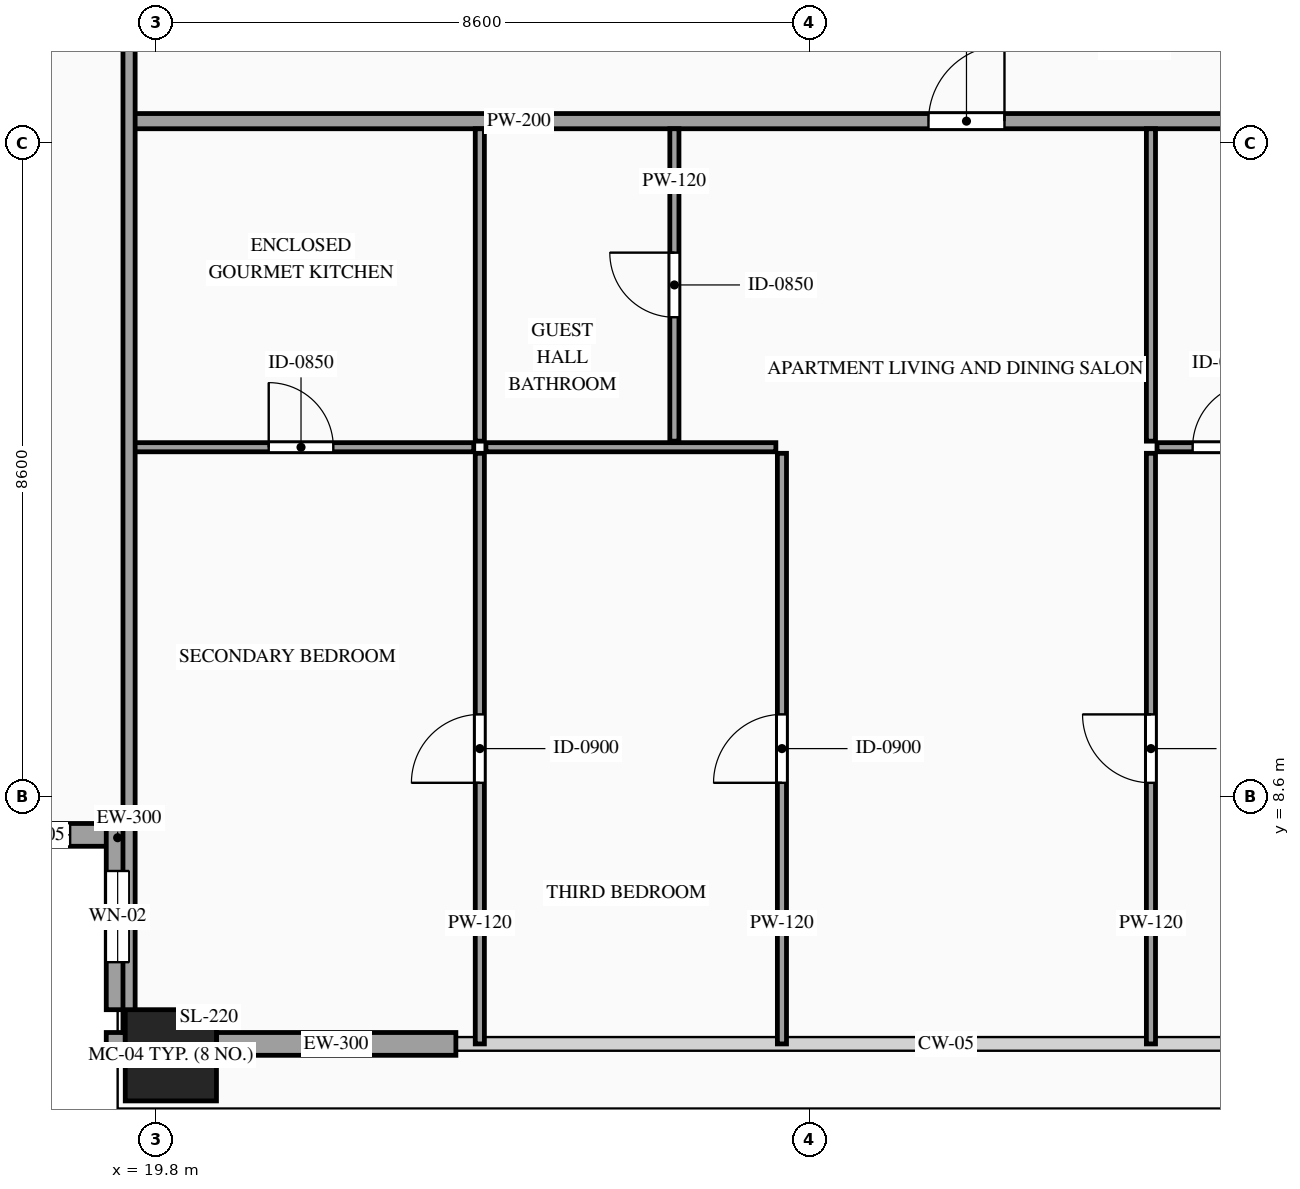
"""IFC4 building model, lengths in metres.
Left out: names, types, materials, properties, quantities, classifications, styles, units other than length and angle.
Written with IfcOpenShell. Run it as: python <this file> out.ifc"""

import sys

from ifc_helpers import new_model, si_unit, direction, frame, frame_2d, origin, origin_2d, place, context, subcontext, project, spatial, rectangle, hollow_rectangle, extrude, source, transform, mapped, element, fill, save


model = new_model("IFC4")
c1 = context("Model", 3, precision=1e-05, world=origin(), true_north=direction((0.0, 1.0)))
c2 = subcontext(c1, "Body", "Model", "MODEL_VIEW")
j1 = project(units=[si_unit("LENGTHUNIT", "METRE"), si_unit("PLANEANGLEUNIT", "RADIAN")], contexts=[c1])
p1 = place(None, origin())
s1 = spatial("IfcSite", under=j1, at=p1, CompositionType="ELEMENT")
p2 = place(p1, origin())
s2 = spatial("IfcBuilding", under=s1, at=p2, CompositionType="ELEMENT")
p3 = place(p2, frame((0.0, 0.0, 231.1)))
s3 = spatial("IfcBuildingStorey", under=s2, at=p3, CompositionType="ELEMENT", Elevation=231.1)
m1 = source(origin(), c2, "Body", "SweptSolid", [
    extrude(hollow_rectangle(XDim=1.2, YDim=1.2, WallThickness=0.055, at=origin_2d()), origin(), (0.0, 0.0, 1.0), 3.5),
])
p4 = place(p3, frame((20.0, 5.2, 0.0), z_axis=(0.0, 0.0, 1.0), x_axis=(1.0, 0.0, 0.0)))
e1 = element("IfcColumn", 1, at=p4, inside=s3, PredefinedType="COLUMN", context=c2, shape_type="MappedRepresentation", body=[
    mapped(m1, transform((0.0, 0.0, 0.0), scale=1.0)),
])
p5 = place(p3, frame((17.0, 8.1, 0.0), z_axis=(0.0, 0.0, 1.0), x_axis=(1.0, 0.0, 0.0)))
e2 = element("IfcWall", 2, at=p5, inside=s3, PredefinedType="SOLIDWALL", context=c2, shape_type="SweptSolid", body=[
    extrude(rectangle(XDim=2.45, YDim=0.3, at=frame_2d((1.225, 0.0))), origin(), (0.0, 0.0, 1.0), 3.28),
])
p6 = place(p5, frame((0.775, 0.0, 0.85)))
e3 = element("IfcOpeningElement", 3, at=p6, cuts=e2, PredefinedType="OPENING", context=c2, shape_type="SweptSolid", body=[
    extrude(rectangle(XDim=0.9, YDim=1.5, at=frame_2d((0.45, 0.75))), frame((0.0, 0.165, 0.0), z_axis=(0.0, -1.0, 0.0), x_axis=(1.0, 0.0, 0.0)), (0.0, 0.0, 1.0), 0.33),
])
p7 = place(p3, frame((19.3, 8.25, 0.0), z_axis=(0.0, 0.0, 1.0), x_axis=(0.0, -1.0, 0.0)))
e4 = element("IfcWall", 4, at=p7, inside=s3, PredefinedType="SOLIDWALL", context=c2, shape_type="SweptSolid", body=[
    extrude(rectangle(XDim=2.45, YDim=0.3, at=frame_2d((1.225, 0.0))), origin(), (0.0, 0.0, 1.0), 3.28),
])
p8 = place(p7, frame((0.625, 0.0, 0.85)))
e5 = element("IfcOpeningElement", 5, at=p8, cuts=e4, PredefinedType="OPENING", context=c2, shape_type="SweptSolid", body=[
    extrude(rectangle(XDim=1.2, YDim=2.1, at=frame_2d((0.6, 1.05))), frame((0.0, 0.165, 0.0), z_axis=(0.0, -1.0, 0.0), x_axis=(1.0, 0.0, 0.0)), (0.0, 0.0, 1.0), 0.33),
])
m2 = source(origin(), c2, "Body", "SweptSolid", [
    extrude(rectangle(XDim=0.25, YDim=0.3, at=frame_2d((0.125, 0.0))), origin(), (0.0, 0.0, 1.0), 3.28),
])
p9 = place(p3, frame((19.15, 5.35, 0.0), z_axis=(0.0, 0.0, 1.0), x_axis=(1.0, 0.0, 0.0)))
e6 = element("IfcWall", 6, at=p9, inside=s3, PredefinedType="SOLIDWALL", context=c2, shape_type="MappedRepresentation", body=[
    mapped(m2, transform((0.0, 0.0, 0.0), scale=1.0)),
])
m3 = source(origin(), c2, "Body", "SweptSolid", [
    extrude(rectangle(XDim=3.15, YDim=0.3, at=frame_2d((1.575, 0.0))), origin(), (0.0, 0.0, 1.0), 2.835),
])
p10 = place(p3, frame((20.6, 5.35, 0.0), z_axis=(0.0, 0.0, 1.0), x_axis=(1.0, 0.0, 0.0)))
e7 = element("IfcWall", 7, at=p10, inside=s3, PredefinedType="SOLIDWALL", context=c2, shape_type="MappedRepresentation", body=[
    mapped(m3, transform((0.0, 0.0, 0.0), scale=1.0)),
])
p11 = place(p3, frame((19.44, 17.49, 0.0), z_axis=(0.0, 0.0, 1.0), x_axis=(1.0, 0.0, 0.0)))
e8 = element("IfcWall", 8, at=p11, inside=s3, PredefinedType="PARTITIONING", context=c2, shape_type="SweptSolid", body=[
    extrude(rectangle(XDim=18.182, YDim=0.2, at=frame_2d((9.091, 0.0))), origin(), (0.0, 0.0, 1.0), 3.28),
])
p12 = place(p11, frame((10.528, 0.0, 0.0)))
e9 = element("IfcOpeningElement", 9, at=p12, cuts=e8, PredefinedType="OPENING", context=c2, shape_type="SweptSolid", body=[
    extrude(rectangle(XDim=1.0, YDim=2.2, at=frame_2d((0.5, 1.1))), frame((0.0, 0.115, 0.0), z_axis=(0.0, -1.0, 0.0), x_axis=(1.0, 0.0, 0.0)), (0.0, 0.0, 1.0), 0.23),
])
p13 = place(p3, frame((19.44, 13.2, 0.0), z_axis=(0.0, 0.0, 1.0), x_axis=(1.0, 0.0, 0.0)))
e10 = element("IfcWall", 10, at=p13, inside=s3, PredefinedType="PARTITIONING", context=c2, shape_type="SweptSolid", body=[
    extrude(rectangle(XDim=4.545, YDim=0.12, at=frame_2d((2.272, 0.0))), origin(), (0.0, 0.0, 1.0), 3.28),
])
p14 = place(p13, frame((1.847, 0.0, 0.0)))
e11 = element("IfcOpeningElement", 11, at=p14, cuts=e10, PredefinedType="OPENING", context=c2, shape_type="SweptSolid", body=[
    extrude(rectangle(XDim=0.85, YDim=2.1, at=frame_2d((0.425, 1.05))), frame((0.0, 0.075, 0.0), z_axis=(0.0, -1.0, 0.0), x_axis=(1.0, 0.0, 0.0)), (0.0, 0.0, 1.0), 0.15),
])
m4 = source(origin(), c2, "Body", "SweptSolid", [
    extrude(rectangle(XDim=4.11, YDim=0.12, at=frame_2d((2.055, 0.0))), origin(), (0.0, 0.0, 1.0), 3.28),
])
p15 = place(p3, frame((24.065, 13.28, 0.0), z_axis=(0.0, 0.0, 1.0), x_axis=(0.0, 1.0, 0.0)))
e12 = element("IfcWall", 12, at=p15, inside=s3, PredefinedType="PARTITIONING", context=c2, shape_type="MappedRepresentation", body=[
    mapped(m4, transform((0.0, 0.0, 0.0), scale=1.0)),
])
p16 = place(p3, frame((26.625, 13.28, 0.0), z_axis=(0.0, 0.0, 1.0), x_axis=(0.0, 1.0, 0.0)))
e13 = element("IfcWall", 13, at=p16, inside=s3, PredefinedType="PARTITIONING", context=c2, shape_type="SweptSolid", body=[
    extrude(rectangle(XDim=4.11, YDim=0.12, at=frame_2d((2.055, 0.0))), origin(), (0.0, 0.0, 1.0), 3.28),
])
p17 = place(p16, frame((1.63, 0.0, 0.0)))
e14 = element("IfcOpeningElement", 14, at=p17, cuts=e13, PredefinedType="OPENING", context=c2, shape_type="SweptSolid", body=[
    extrude(rectangle(XDim=0.85, YDim=2.1, at=frame_2d((0.425, 1.05))), frame((0.0, 0.075, 0.0), z_axis=(0.0, -1.0, 0.0), x_axis=(1.0, 0.0, 0.0)), (0.0, 0.0, 1.0), 0.15),
])
p18 = place(p3, frame((32.895, 13.28, 0.0), z_axis=(0.0, 0.0, 1.0), x_axis=(0.0, 1.0, 0.0)))
e15 = element("IfcWall", 15, at=p18, inside=s3, PredefinedType="PARTITIONING", context=c2, shape_type="MappedRepresentation", body=[
    mapped(m4, transform((0.0, 0.0, 0.0), scale=1.0)),
])
p19 = place(p3, frame((24.065, 5.35, 0.0), z_axis=(0.0, 0.0, 1.0), x_axis=(0.0, 1.0, 0.0)))
e16 = element("IfcWall", 16, at=p19, inside=s3, PredefinedType="PARTITIONING", context=c2, shape_type="SweptSolid", body=[
    extrude(rectangle(XDim=7.77, YDim=0.12, at=frame_2d((3.885, 0.0))), origin(), (0.0, 0.0, 1.0), 3.28),
])
p20 = place(p19, frame((3.435, 0.0, 0.0)))
e17 = element("IfcOpeningElement", 17, at=p20, cuts=e16, PredefinedType="OPENING", context=c2, shape_type="SweptSolid", body=[
    extrude(rectangle(XDim=0.9, YDim=2.15, at=frame_2d((0.45, 1.075))), frame((0.0, 0.075, 0.0), z_axis=(0.0, -1.0, 0.0), x_axis=(1.0, 0.0, 0.0)), (0.0, 0.0, 1.0), 0.15),
])
p21 = place(p3, frame((32.975, 13.2, 0.0), z_axis=(0.0, 0.0, 1.0), x_axis=(1.0, 0.0, 0.0)))
e18 = element("IfcWall", 18, at=p21, inside=s3, PredefinedType="PARTITIONING", context=c2, shape_type="SweptSolid", body=[
    extrude(rectangle(XDim=4.647, YDim=0.12, at=frame_2d((2.323, 0.0))), origin(), (0.0, 0.0, 1.0), 3.28),
])
p22 = place(p21, frame((2.872, 0.0, 0.0)))
e19 = element("IfcOpeningElement", 19, at=p22, cuts=e18, PredefinedType="OPENING", context=c2, shape_type="SweptSolid", body=[
    extrude(rectangle(XDim=0.85, YDim=2.1, at=frame_2d((0.425, 1.05))), frame((0.0, 0.075, 0.0), z_axis=(0.0, -1.0, 0.0), x_axis=(1.0, 0.0, 0.0)), (0.0, 0.0, 1.0), 0.15),
])
p23 = place(p21, frame((0.469, 0.0, 0.0)))
e20 = element("IfcOpeningElement", 20, at=p23, cuts=e18, PredefinedType="OPENING", context=c2, shape_type="SweptSolid", body=[
    extrude(rectangle(XDim=0.85, YDim=2.1, at=frame_2d((0.425, 1.05))), frame((0.0, 0.075, 0.0), z_axis=(0.0, -1.0, 0.0), x_axis=(1.0, 0.0, 0.0)), (0.0, 0.0, 1.0), 0.15),
])
p24 = place(p3, frame((32.895, 5.35, 0.0), z_axis=(0.0, 0.0, 1.0), x_axis=(0.0, 1.0, 0.0)))
e21 = element("IfcWall", 21, at=p24, inside=s3, PredefinedType="PARTITIONING", context=c2, shape_type="SweptSolid", body=[
    extrude(rectangle(XDim=7.77, YDim=0.12, at=frame_2d((3.885, 0.0))), origin(), (0.0, 0.0, 1.0), 3.28),
])
p25 = place(p24, frame((3.435, 0.0, 0.0)))
e22 = element("IfcOpeningElement", 22, at=p25, cuts=e21, PredefinedType="OPENING", context=c2, shape_type="SweptSolid", body=[
    extrude(rectangle(XDim=0.9, YDim=2.15, at=frame_2d((0.45, 1.075))), frame((0.0, 0.075, 0.0), z_axis=(0.0, -1.0, 0.0), x_axis=(1.0, 0.0, 0.0)), (0.0, 0.0, 1.0), 0.15),
])
m5 = source(origin(), c2, "Body", "SweptSolid", [
    extrude(rectangle(XDim=3.815, YDim=0.12, at=frame_2d((1.907, 0.0))), origin(), (0.0, 0.0, 1.0), 3.28),
])
p26 = place(p3, frame((24.145, 13.2, 0.0), z_axis=(0.0, 0.0, 1.0), x_axis=(1.0, 0.0, 0.0)))
e23 = element("IfcWall", 23, at=p26, inside=s3, PredefinedType="PARTITIONING", context=c2, shape_type="MappedRepresentation", body=[
    mapped(m5, transform((0.0, 0.0, 0.0), scale=1.0)),
])
p27 = place(p3, frame((28.04, 5.35, 0.0), z_axis=(0.0, 0.0, 1.0), x_axis=(0.0, 1.0, 0.0)))
e24 = element("IfcWall", 24, at=p27, inside=s3, PredefinedType="PARTITIONING", context=c2, shape_type="SweptSolid", body=[
    extrude(rectangle(XDim=7.77, YDim=0.12, at=frame_2d((3.885, 0.0))), origin(), (0.0, 0.0, 1.0), 3.28),
])
p28 = place(p27, frame((3.435, 0.0, 0.0)))
e25 = element("IfcOpeningElement", 25, at=p28, cuts=e24, PredefinedType="OPENING", context=c2, shape_type="SweptSolid", body=[
    extrude(rectangle(XDim=0.9, YDim=2.15, at=frame_2d((0.45, 1.075))), frame((0.0, 0.075, 0.0), z_axis=(0.0, -1.0, 0.0), x_axis=(1.0, 0.0, 0.0)), (0.0, 0.0, 1.0), 0.15),
])
m6 = source(origin(), c2, "Body", "SweptSolid", [
    extrude(rectangle(XDim=26.69, YDim=0.16, at=frame_2d((13.345, 0.0))), origin(), (0.0, 0.0, 1.0), 3.28),
])
p29 = place(p3, frame((19.45, 5.5, 0.0), z_axis=(0.0, 0.0, 1.0), x_axis=(0.0, 1.0, 0.0)))
e26 = element("IfcWall", 26, at=p29, inside=s3, PredefinedType="PARTITIONING", context=c2, shape_type="MappedRepresentation", body=[
    mapped(m6, transform((0.0, 0.0, 0.0), scale=1.0)),
])
m7 = source(origin(), c2, "Body", "SweptSolid", [
    extrude(rectangle(XDim=0.9, YDim=1.5, at=frame_2d((0.45, 0.75))), frame((0.0, 0.03, 0.0), z_axis=(0.0, -1.0, 0.0), x_axis=(1.0, 0.0, 0.0)), (0.0, 0.0, 1.0), 0.06),
])
p30 = place(p6, origin())
e27 = element("IfcWindow", 27, at=p30, inside=s3, PartitioningType="SINGLE_PANEL", PredefinedType="WINDOW", context=c2, shape_type="MappedRepresentation", body=[
    mapped(m7, transform((0.0, 0.0, 0.0), scale=1.0)),
])
fill(e3, e27)
m8 = source(origin(), c2, "Body", "SweptSolid", [
    extrude(rectangle(XDim=1.2, YDim=2.1, at=frame_2d((0.6, 1.05))), frame((0.0, 0.03, 0.0), z_axis=(0.0, -1.0, 0.0), x_axis=(1.0, 0.0, 0.0)), (0.0, 0.0, 1.0), 0.06),
])
p31 = place(p8, origin())
e28 = element("IfcWindow", 28, at=p31, inside=s3, PartitioningType="SINGLE_PANEL", PredefinedType="WINDOW", context=c2, shape_type="MappedRepresentation", body=[
    mapped(m8, transform((0.0, 0.0, 0.0), scale=1.0)),
])
fill(e5, e28)
m9 = source(origin(), c2, "Body", "SweptSolid", [
    extrude(rectangle(XDim=1.0, YDim=2.2, at=frame_2d((0.5, 1.1))), frame((0.0, 0.025, 0.0), z_axis=(0.0, -1.0, 0.0), x_axis=(1.0, 0.0, 0.0)), (0.0, 0.0, 1.0), 0.05),
])
p32 = place(p12, origin())
e29 = element("IfcDoor", 29, at=p32, inside=s3, OperationType="SINGLE_SWING_RIGHT", PredefinedType="DOOR", context=c2, shape_type="MappedRepresentation", body=[
    mapped(m9, transform((0.0, 0.0, 0.0), scale=1.0)),
])
fill(e9, e29)
m10 = source(origin(), c2, "Body", "SweptSolid", [
    extrude(rectangle(XDim=0.85, YDim=2.1, at=frame_2d((0.425, 1.05))), frame((0.0, 0.025, 0.0), z_axis=(0.0, -1.0, 0.0), x_axis=(1.0, 0.0, 0.0)), (0.0, 0.0, 1.0), 0.05),
])
p33 = place(p14, origin())
e30 = element("IfcDoor", 30, at=p33, inside=s3, OperationType="SINGLE_SWING_LEFT", PredefinedType="DOOR", context=c2, shape_type="MappedRepresentation", body=[
    mapped(m10, transform((0.0, 0.0, 0.0), scale=1.0)),
])
fill(e11, e30)
p34 = place(p17, origin())
e31 = element("IfcDoor", 31, at=p34, inside=s3, OperationType="SINGLE_SWING_RIGHT", PredefinedType="DOOR", context=c2, shape_type="MappedRepresentation", body=[
    mapped(m10, transform((0.0, 0.0, 0.0), scale=1.0)),
])
fill(e14, e31)
p35 = place(p23, origin())
e32 = element("IfcDoor", 32, at=p35, inside=s3, OperationType="SINGLE_SWING_RIGHT", PredefinedType="DOOR", context=c2, shape_type="MappedRepresentation", body=[
    mapped(m10, transform((0.0, 0.0, 0.0), scale=1.0)),
])
fill(e20, e32)
m11 = source(origin(), c2, "Body", "SweptSolid", [
    extrude(rectangle(XDim=0.9, YDim=2.15, at=frame_2d((0.45, 1.075))), frame((0.0, 0.025, 0.0), z_axis=(0.0, -1.0, 0.0), x_axis=(1.0, 0.0, 0.0)), (0.0, 0.0, 1.0), 0.05),
])
p36 = place(p20, origin())
e33 = element("IfcDoor", 33, at=p36, inside=s3, OperationType="SINGLE_SWING_LEFT", PredefinedType="DOOR", context=c2, shape_type="MappedRepresentation", body=[
    mapped(m11, transform((0.0, 0.0, 0.0), scale=1.0)),
])
fill(e17, e33)
p37 = place(p25, origin())
e34 = element("IfcDoor", 34, at=p37, inside=s3, OperationType="SINGLE_SWING_RIGHT", PredefinedType="DOOR", context=c2, shape_type="MappedRepresentation", body=[
    mapped(m11, transform((0.0, 0.0, 0.0), scale=1.0)),
])
fill(e22, e34)
p38 = place(p28, origin())
e35 = element("IfcDoor", 35, at=p38, inside=s3, OperationType="SINGLE_SWING_LEFT", PredefinedType="DOOR", context=c2, shape_type="MappedRepresentation", body=[
    mapped(m11, transform((0.0, 0.0, 0.0), scale=1.0)),
])
fill(e25, e35)
save(model, sys.argv[1])
